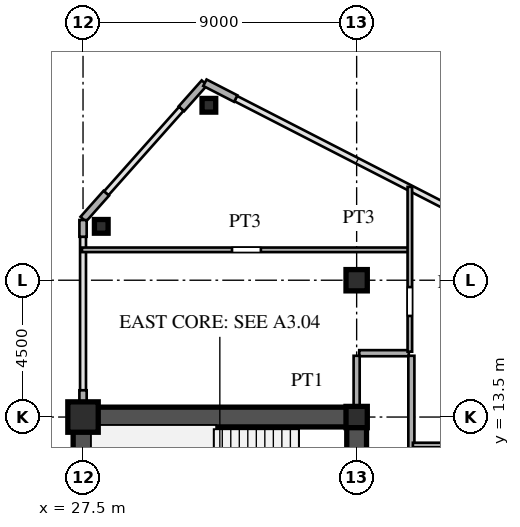
"""IFC4 building model, lengths in metres.
Left out: names, types, materials, properties, quantities, classifications, styles, units other than length and angle.
Written with IfcOpenShell. Run it as: python <this file> out.ifc"""

import sys

from ifc_helpers import new_model, si_unit, direction, frame, frame_2d, origin, origin_2d, place, context, subcontext, project, spatial, rectangle, hollow_rectangle, i_section, extrude, source, transform, mapped, element, save


model = new_model("IFC4")
c1 = context("Model", 3, precision=1e-05, world=origin(), true_north=direction((0.0, 1.0)))
c2 = subcontext(c1, "Body", "Model", "MODEL_VIEW")
j1 = project(units=[si_unit("LENGTHUNIT", "METRE"), si_unit("PLANEANGLEUNIT", "RADIAN")], contexts=[c1])
p1 = place(None, origin())
s1 = spatial("IfcSite", under=j1, at=p1, CompositionType="ELEMENT")
p2 = place(p1, origin())
s2 = spatial("IfcBuilding", under=s1, at=p2, CompositionType="ELEMENT")
p3 = place(p2, frame((0.0, 0.0, 110.4)))
s3 = spatial("IfcBuildingStorey", under=s2, at=p3, CompositionType="ELEMENT", Elevation=110.4)
m1 = source(origin(), c2, "Body", "SweptSolid", [
    extrude(hollow_rectangle(XDim=1.0, YDim=1.0, WallThickness=0.042, at=origin_2d()), origin(), (0.0, 0.0, 1.0), 3.6),
])
p4 = place(p3, frame((27.5, 13.5, 0.0), z_axis=(0.0, 0.0, 1.0), x_axis=(1.0, 0.0, 0.0)))
e1 = element("IfcColumn", 1, at=p4, inside=s3, PredefinedType="COLUMN", context=c2, shape_type="MappedRepresentation", body=[
    mapped(m1, transform((0.0, 0.0, 0.0), scale=1.0)),
])
m2 = source(origin(), c2, "Body", "SweptSolid", [
    extrude(i_section(OverallWidth=0.7, OverallDepth=0.7, WebThickness=0.028, FlangeThickness=0.045, at=origin_2d()), origin(), (0.0, 0.0, 1.0), 3.6),
])
for number, where, z_axis, x_axis in (
    (2, (36.5, 13.5, 0.0), (0.0, 0.0, 1.0), (1.0, 0.0, 0.0)),
    (3, (36.5, 18.0, 0.0), (0.0, 0.0, 1.0), (1.0, 0.0, 0.0)),
):
    element("IfcColumn", number, at=place(p3, frame(where, z_axis=z_axis, x_axis=x_axis)), inside=s3, PredefinedType="COLUMN", context=c2, shape_type="MappedRepresentation", body=[
        mapped(m2, transform((0.0, 0.0, 0.0), scale=1.0)),
    ])
m3 = source(origin(), c2, "Body", "SweptSolid", [
    extrude(hollow_rectangle(XDim=0.45, YDim=0.45, WallThickness=0.018, at=origin_2d()), origin(), (0.0, 0.0, 1.0), 3.6),
])
for number, where, z_axis, x_axis in (
    (4, (31.64, 23.754, 0.0), (0.0, 0.0, 1.0), (1.0, 0.0, 0.0)),
    (5, (28.1, 19.772, 0.0), (0.0, 0.0, 1.0), (1.0, 0.0, 0.0)),
):
    element("IfcColumn", number, at=place(p3, frame(where, z_axis=z_axis, x_axis=x_axis)), inside=s3, PredefinedType="COLUMN", context=c2, shape_type="MappedRepresentation", body=[
        mapped(m3, transform((0.0, 0.0, 0.0), scale=1.0)),
    ])
p5 = place(p3, frame((32.523, 23.975, 0.0), z_axis=(0.0, 0.0, 1.0), x_axis=(-0.889797395748, 0.456355776255, 0.0)))
e6 = element("IfcWall", 6, at=p5, inside=s3, PredefinedType="SOLIDWALL", context=c2, shape_type="SweptSolid", body=[
    extrude(rectangle(XDim=1.14, YDim=0.24, at=frame_2d((0.57, 0.0))), origin(), (0.0, 0.0, 1.0), 3.38),
])
for number, where, z_axis, x_axis in (
    (7, (31.493, 24.492, 0.0), (0.0, 0.0, 1.0), (-0.664, -0.747, 0.0)),
    (8, (28.264, 20.86, 0.0), (0.0, 0.0, 1.0), (-0.664, -0.747, 0.0)),
):
    element("IfcWall", number, at=place(p3, frame(where, z_axis=z_axis, x_axis=x_axis)), inside=s3, PredefinedType="SOLIDWALL", context=c2, shape_type="SweptSolid", body=[
        extrude(rectangle(XDim=1.14, YDim=0.24, at=frame_2d((0.57, 0.0))), origin(), (0.0, 0.0, 1.0), 3.38),
    ])
p6 = place(p3, frame((27.5, 13.83, 0.0), z_axis=(0.0, 0.0, 1.0), x_axis=(0.0, 1.0, 0.0)))
e9 = element("IfcWall", 9, at=p6, inside=s3, PredefinedType="SOLIDWALL", context=c2, shape_type="SweptSolid", body=[
    extrude(rectangle(XDim=0.55, YDim=0.24, at=frame_2d((0.275, 0.0))), origin(), (0.0, 0.0, 1.0), 2.88),
])
p7 = place(p3, frame((27.5, 19.43, 0.0), z_axis=(0.0, 0.0, 1.0), x_axis=(0.0, 1.0, 0.0)))
e10 = element("IfcWall", 10, at=p7, inside=s3, PredefinedType="SOLIDWALL", context=c2, shape_type="SweptSolid", body=[
    extrude(rectangle(XDim=0.55, YDim=0.24, at=frame_2d((0.275, 0.0))), origin(), (0.0, 0.0, 1.0), 3.38),
])
p8 = place(p3, frame((27.5, 1.3, 0.0), z_axis=(0.0, 0.0, 1.0), x_axis=(0.0, 1.0, 0.0)))
e11 = element("IfcWall", 11, at=p8, inside=s3, PredefinedType="SHEAR", context=c2, shape_type="SweptSolid", body=[
    extrude(rectangle(XDim=12.2, YDim=0.65, at=frame_2d((6.1, 0.0))), origin(), (0.0, 0.0, 1.0), 3.38),
])
p9 = place(p3, frame((27.5, 13.5, 0.0), z_axis=(0.0, 0.0, 1.0), x_axis=(1.0, 0.0, 0.0)))
e12 = element("IfcWall", 12, at=p9, inside=s3, PredefinedType="SHEAR", context=c2, shape_type="SweptSolid", body=[
    extrude(rectangle(XDim=9.0, YDim=0.65, at=frame_2d((4.5, 0.0))), origin(), (0.0, 0.0, 1.0), 3.38),
])
p10 = place(p3, frame((36.5, 8.2, 0.0), z_axis=(0.0, 0.0, 1.0), x_axis=(0.0, 1.0, 0.0)))
e13 = element("IfcWall", 13, at=p10, inside=s3, PredefinedType="SHEAR", context=c2, shape_type="SweptSolid", body=[
    extrude(rectangle(XDim=5.45, YDim=0.65, at=frame_2d((2.725, 0.0))), origin(), (0.0, 0.0, 1.0), 3.38),
])
p11 = place(p10, frame((0.245, 0.0, 0.0)))
e14 = element("IfcOpeningElement", 14, at=p11, cuts=e13, PredefinedType="OPENING", context=c2, shape_type="SweptSolid", body=[
    extrude(rectangle(XDim=0.95, YDim=2.15, at=frame_2d((0.475, 1.075))), frame((0.0, 0.335, 0.0), z_axis=(0.0, -1.0, 0.0), x_axis=(1.0, 0.0, 0.0)), (0.0, 0.0, 1.0), 0.67),
])
p12 = place(p3, frame((38.35, 12.58, 0.0), z_axis=(0.0, 0.0, 1.0), x_axis=(1.0, 0.0, 0.0)))
e15 = element("IfcWall", 15, at=p12, inside=s3, PredefinedType="PARTITIONING", context=c2, shape_type="SweptSolid", body=[
    extrude(rectangle(XDim=5.7, YDim=0.15, at=frame_2d((2.85, 0.0))), origin(), (0.0, 0.0, 1.0), 3.38),
])
p13 = place(p12, frame((2.375, 0.0, 0.0)))
e16 = element("IfcOpeningElement", 16, at=p13, cuts=e15, PredefinedType="OPENING", context=c2, shape_type="SweptSolid", body=[
    extrude(rectangle(XDim=0.95, YDim=2.15, at=frame_2d((0.475, 1.075))), frame((0.0, 0.085, 0.0), z_axis=(0.0, -1.0, 0.0), x_axis=(1.0, 0.0, 0.0)), (0.0, 0.0, 1.0), 0.17),
])
p14 = place(p3, frame((36.585, 15.6, 0.0), z_axis=(0.0, 0.0, 1.0), x_axis=(1.0, 0.0, 0.0)))
e17 = element("IfcWall", 17, at=p14, inside=s3, PredefinedType="PARTITIONING", context=c2, shape_type="SweptSolid", body=[
    extrude(rectangle(XDim=1.63, YDim=0.2, at=frame_2d((0.815, 0.0))), origin(), (0.0, 0.0, 1.0), 3.38),
])
p15 = place(p3, frame((27.465, 19.0, 0.0), z_axis=(0.0, 0.0, 1.0), x_axis=(1.0, 0.0, 0.0)))
e18 = element("IfcWall", 18, at=p15, inside=s3, PredefinedType="PARTITIONING", context=c2, shape_type="SweptSolid", body=[
    extrude(rectangle(XDim=10.735, YDim=0.15, at=frame_2d((5.367, 0.0))), origin(), (0.0, 0.0, 1.0), 3.38),
])
p16 = place(p15, frame((4.935, 0.0, 0.0)))
e19 = element("IfcOpeningElement", 19, at=p16, cuts=e18, PredefinedType="OPENING", context=c2, shape_type="SweptSolid", body=[
    extrude(rectangle(XDim=0.95, YDim=2.15, at=frame_2d((0.475, 1.075))), frame((0.0, 0.085, 0.0), z_axis=(0.0, -1.0, 0.0), x_axis=(1.0, 0.0, 0.0)), (0.0, 0.0, 1.0), 0.17),
])
p17 = place(p3, frame((36.5, 13.83, 0.0), z_axis=(0.0, 0.0, 1.0), x_axis=(0.0, 1.0, 0.0)))
e20 = element("IfcWall", 20, at=p17, inside=s3, PredefinedType="PARTITIONING", context=c2, shape_type="SweptSolid", body=[
    extrude(rectangle(XDim=1.685, YDim=0.2, at=frame_2d((0.842, 0.0))), origin(), (0.0, 0.0, 1.0), 2.78),
])
p18 = place(p3, frame((38.25, 15.65, 0.0), z_axis=(0.0, 0.0, 1.0), x_axis=(0.0, 1.0, 0.0)))
e21 = element("IfcWall", 21, at=p18, inside=s3, PredefinedType="PARTITIONING", context=c2, shape_type="SweptSolid", body=[
    extrude(rectangle(XDim=5.421, YDim=0.15, at=frame_2d((2.71, 0.0))), origin(), (0.0, 0.0, 1.0), 3.38),
])
p19 = place(p18, frame((1.175, 0.0, 0.0)))
e22 = element("IfcOpeningElement", 22, at=p19, cuts=e21, PredefinedType="OPENING", context=c2, shape_type="SweptSolid", body=[
    extrude(rectangle(XDim=0.95, YDim=2.15, at=frame_2d((0.475, 1.075))), frame((0.0, 0.085, 0.0), z_axis=(0.0, -1.0, 0.0), x_axis=(1.0, 0.0, 0.0)), (0.0, 0.0, 1.0), 0.17),
])
p20 = place(p3, frame((38.3, -15.515, 0.0), z_axis=(0.0, 0.0, 1.0), x_axis=(0.0, 1.0, 0.0)))
e23 = element("IfcWall", 23, at=p20, inside=s3, PredefinedType="PARTITIONING", context=c2, shape_type="SweptSolid", body=[
    extrude(rectangle(XDim=31.03, YDim=0.2, at=frame_2d((15.515, 0.0))), origin(), (0.0, 0.0, 1.0), 3.38),
])
p21 = place(p20, frame((3.345, 0.0, 0.0)))
e24 = element("IfcOpeningElement", 24, at=p21, cuts=e23, PredefinedType="OPENING", context=c2, shape_type="SweptSolid", body=[
    extrude(rectangle(XDim=1.05, YDim=2.25, at=frame_2d((0.525, 1.125))), frame((0.0, 0.11, 0.0), z_axis=(0.0, -1.0, 0.0), x_axis=(1.0, 0.0, 0.0)), (0.0, 0.0, 1.0), 0.22),
])
p22 = place(p20, frame((14.28, 0.0, 0.0)))
e25 = element("IfcOpeningElement", 25, at=p22, cuts=e23, PredefinedType="OPENING", context=c2, shape_type="SweptSolid", body=[
    extrude(rectangle(XDim=1.05, YDim=2.25, at=frame_2d((0.525, 1.125))), frame((0.0, 0.11, 0.0), z_axis=(0.0, -1.0, 0.0), x_axis=(1.0, 0.0, 0.0)), (0.0, 0.0, 1.0), 0.22),
])
p23 = place(p20, frame((26.067, 0.0, 0.0)))
e26 = element("IfcOpeningElement", 26, at=p23, cuts=e23, PredefinedType="OPENING", context=c2, shape_type="SweptSolid", body=[
    extrude(rectangle(XDim=1.05, YDim=2.25, at=frame_2d((0.525, 1.125))), frame((0.0, 0.11, 0.0), z_axis=(0.0, -1.0, 0.0), x_axis=(1.0, 0.0, 0.0)), (0.0, 0.0, 1.0), 0.22),
])
save(model, sys.argv[1])
